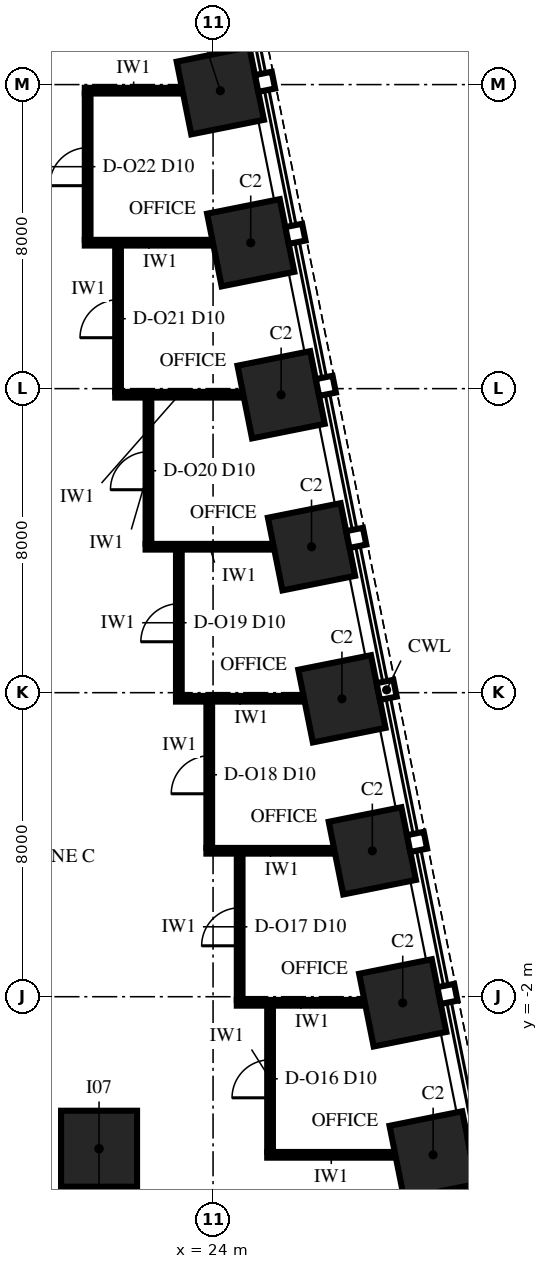
"""IFC4 building model, lengths in metres.
Left out: names, types, materials, properties, quantities, classifications, styles, units other than length and angle.
Written with IfcOpenShell. Run it as: python <this file> out.ifc"""

import sys

from ifc_helpers import new_model, si_unit, direction, frame, frame_2d, origin, origin_2d, place, context, subcontext, project, spatial, rectangle, extrude, element, fill, save


model = new_model("IFC4")
c1 = context("Model", 3, precision=1e-05, world=origin(), true_north=direction((0.0, 1.0)))
c2 = subcontext(c1, "Body", "Model", "MODEL_VIEW")
j1 = project(units=[si_unit("LENGTHUNIT", "METRE"), si_unit("PLANEANGLEUNIT", "RADIAN")], contexts=[c1])
p1 = place(None, origin())
s1 = spatial("IfcSite", under=j1, at=p1, CompositionType="ELEMENT")
p2 = place(p1, origin())
s2 = spatial("IfcBuilding", under=s1, at=p2, CompositionType="ELEMENT")
p3 = place(p2, frame((0.0, 0.0, 84.0)))
s3 = spatial("IfcBuildingStorey", under=s2, at=p3, CompositionType="ELEMENT", Elevation=84.0)
for number, where, z_axis, x_axis in (
    (1, (29.791, -6.162, 0.0), (0.0, 0.0, 1.0), (-0.196, 0.981, 0.0)),
    (2, (28.991, -2.162, 0.0), (0.0, 0.0, 1.0), (-0.196, 0.981, 0.0)),
    (3, (28.191, 1.838, 0.0), (0.0, 0.0, 1.0), (-0.196, 0.981, 0.0)),
    (4, (27.391, 5.838, 0.0), (0.0, 0.0, 1.0), (-0.196, 0.981, 0.0)),
    (5, (26.591, 9.838, 0.0), (0.0, 0.0, 1.0), (-0.196, 0.981, 0.0)),
    (6, (25.791, 13.838, 0.0), (0.0, 0.0, 1.0), (-0.196, 0.981, 0.0)),
    (7, (24.991, 17.838, 0.0), (0.0, 0.0, 1.0), (-0.196, 0.981, 0.0)),
    (8, (24.191, 21.838, 0.0), (0.0, 0.0, 1.0), (-0.196, 0.981, 0.0)),
):
    element("IfcColumn", number, at=place(p3, frame(where, z_axis=z_axis, x_axis=x_axis)), inside=s3, PredefinedType="COLUMN", context=c2, shape_type="SweptSolid", body=[
        extrude(rectangle(XDim=1.95, YDim=1.95, at=origin_2d()), origin(), (0.0, 0.0, 1.0), 4.0),
    ])
p4 = place(p3, frame((21.0, -6.0, 0.0), z_axis=(0.0, 0.0, 1.0), x_axis=(1.0, 0.0, 0.0)))
e9 = element("IfcColumn", 9, at=p4, inside=s3, PredefinedType="COLUMN", context=c2, shape_type="SweptSolid", body=[
    extrude(rectangle(XDim=2.0, YDim=2.0, at=origin_2d()), origin(), (0.0, 0.0, 1.0), 4.0),
])
p5 = place(p3, frame((25.425, -6.16, 0.0), z_axis=(0.0, 0.0, 1.0), x_axis=(1.0, 0.0, 0.0)))
e10 = element("IfcWall", 10, at=p5, inside=s3, PredefinedType="PARTITIONING", context=c2, shape_type="SweptSolid", body=[
    extrude(rectangle(XDim=3.371, YDim=0.15, at=frame_2d((1.686, 0.0))), origin(), (0.0, 0.0, 1.0), 2.842),
])
for number, where, z_axis, x_axis in (
    (11, (24.625, -2.16, 0.0), (0.0, 0.0, 1.0), (1.0, 0.0, 0.0)),
    (12, (23.825, 1.84, 0.0), (0.0, 0.0, 1.0), (1.0, 0.0, 0.0)),
):
    element("IfcWall", number, at=place(p3, frame(where, z_axis=z_axis, x_axis=x_axis)), inside=s3, PredefinedType="PARTITIONING", context=c2, shape_type="SweptSolid", body=[
        extrude(rectangle(XDim=3.371, YDim=0.15, at=frame_2d((1.686, 0.0))), origin(), (0.0, 0.0, 1.0), 3.25),
    ])
p6 = place(p3, frame((23.025, 5.84, 0.0), z_axis=(0.0, 0.0, 1.0), x_axis=(1.0, 0.0, 0.0)))
e13 = element("IfcWall", 13, at=p6, inside=s3, PredefinedType="PARTITIONING", context=c2, shape_type="SweptSolid", body=[
    extrude(rectangle(XDim=3.372, YDim=0.15, at=frame_2d((1.686, 0.0))), origin(), (0.0, 0.0, 1.0), 2.842),
])
for number, where, z_axis, x_axis in (
    (14, (22.225, 9.84, 0.0), (0.0, 0.0, 1.0), (1.0, 0.0, 0.0)),
    (15, (21.425, 13.84, 0.0), (0.0, 0.0, 1.0), (1.0, 0.0, 0.0)),
    (16, (20.625, 17.84, 0.0), (0.0, 0.0, 1.0), (1.0, 0.0, 0.0)),
):
    element("IfcWall", number, at=place(p3, frame(where, z_axis=z_axis, x_axis=x_axis)), inside=s3, PredefinedType="PARTITIONING", context=c2, shape_type="SweptSolid", body=[
        extrude(rectangle(XDim=3.371, YDim=0.15, at=frame_2d((1.686, 0.0))), origin(), (0.0, 0.0, 1.0), 3.25),
    ])
p7 = place(p3, frame((20.625, 21.84, 0.0), z_axis=(0.0, 0.0, 1.0), x_axis=(1.0, 0.0, 0.0)))
e17 = element("IfcWall", 17, at=p7, inside=s3, PredefinedType="PARTITIONING", context=c2, shape_type="SweptSolid", body=[
    extrude(rectangle(XDim=2.571, YDim=0.15, at=frame_2d((1.286, 0.0))), origin(), (0.0, 0.0, 1.0), 3.25),
])
p8 = place(p3, frame((20.7, 17.915, 0.0), z_axis=(0.0, 0.0, 1.0), x_axis=(0.0, 1.0, 0.0)))
e18 = element("IfcWall", 18, at=p8, inside=s3, PredefinedType="PARTITIONING", context=c2, shape_type="SweptSolid", body=[
    extrude(rectangle(XDim=3.85, YDim=0.15, at=frame_2d((1.925, 0.0))), origin(), (0.0, 0.0, 1.0), 3.25),
])
p9 = place(p8, frame((1.425, 0.0, 0.0)))
e19 = element("IfcOpeningElement", 19, at=p9, cuts=e18, PredefinedType="OPENING", context=c2, shape_type="SweptSolid", body=[
    extrude(rectangle(XDim=1.0, YDim=2.3, at=frame_2d((0.5, 1.15))), frame((0.0, 0.09, 0.0), z_axis=(0.0, -1.0, 0.0), x_axis=(1.0, 0.0, 0.0)), (0.0, 0.0, 1.0), 0.18),
])
p10 = place(p3, frame((21.5, 13.915, 0.0), z_axis=(0.0, 0.0, 1.0), x_axis=(0.0, 1.0, 0.0)))
e20 = element("IfcWall", 20, at=p10, inside=s3, PredefinedType="PARTITIONING", context=c2, shape_type="SweptSolid", body=[
    extrude(rectangle(XDim=3.85, YDim=0.15, at=frame_2d((1.925, 0.0))), origin(), (0.0, 0.0, 1.0), 3.25),
])
p11 = place(p10, frame((1.425, 0.0, 0.0)))
e21 = element("IfcOpeningElement", 21, at=p11, cuts=e20, PredefinedType="OPENING", context=c2, shape_type="SweptSolid", body=[
    extrude(rectangle(XDim=1.0, YDim=2.3, at=frame_2d((0.5, 1.15))), frame((0.0, 0.09, 0.0), z_axis=(0.0, -1.0, 0.0), x_axis=(1.0, 0.0, 0.0)), (0.0, 0.0, 1.0), 0.18),
])
p12 = place(p3, frame((22.3, 9.915, 0.0), z_axis=(0.0, 0.0, 1.0), x_axis=(0.0, 1.0, 0.0)))
e22 = element("IfcWall", 22, at=p12, inside=s3, PredefinedType="PARTITIONING", context=c2, shape_type="SweptSolid", body=[
    extrude(rectangle(XDim=3.85, YDim=0.15, at=frame_2d((1.925, 0.0))), origin(), (0.0, 0.0, 1.0), 3.85),
])
p13 = place(p12, frame((1.425, 0.0, 0.0)))
e23 = element("IfcOpeningElement", 23, at=p13, cuts=e22, PredefinedType="OPENING", context=c2, shape_type="SweptSolid", body=[
    extrude(rectangle(XDim=1.0, YDim=2.3, at=frame_2d((0.5, 1.15))), frame((0.0, 0.09, 0.0), z_axis=(0.0, -1.0, 0.0), x_axis=(1.0, 0.0, 0.0)), (0.0, 0.0, 1.0), 0.18),
])
p14 = place(p3, frame((23.1, 5.915, 0.0), z_axis=(0.0, 0.0, 1.0), x_axis=(0.0, 1.0, 0.0)))
e24 = element("IfcWall", 24, at=p14, inside=s3, PredefinedType="PARTITIONING", context=c2, shape_type="SweptSolid", body=[
    extrude(rectangle(XDim=3.85, YDim=0.15, at=frame_2d((1.925, 0.0))), origin(), (0.0, 0.0, 1.0), 2.842),
])
p15 = place(p14, frame((1.425, 0.0, 0.0)))
e25 = element("IfcOpeningElement", 25, at=p15, cuts=e24, PredefinedType="OPENING", context=c2, shape_type="SweptSolid", body=[
    extrude(rectangle(XDim=1.0, YDim=2.3, at=frame_2d((0.5, 1.15))), frame((0.0, 0.09, 0.0), z_axis=(0.0, -1.0, 0.0), x_axis=(1.0, 0.0, 0.0)), (0.0, 0.0, 1.0), 0.18),
])
p16 = place(p3, frame((23.9, 1.915, 0.0), z_axis=(0.0, 0.0, 1.0), x_axis=(0.0, 1.0, 0.0)))
e26 = element("IfcWall", 26, at=p16, inside=s3, PredefinedType="PARTITIONING", context=c2, shape_type="SweptSolid", body=[
    extrude(rectangle(XDim=3.85, YDim=0.15, at=frame_2d((1.925, 0.0))), origin(), (0.0, 0.0, 1.0), 3.85),
])
p17 = place(p16, frame((1.425, 0.0, 0.0)))
e27 = element("IfcOpeningElement", 27, at=p17, cuts=e26, PredefinedType="OPENING", context=c2, shape_type="SweptSolid", body=[
    extrude(rectangle(XDim=1.0, YDim=2.3, at=frame_2d((0.5, 1.15))), frame((0.0, 0.09, 0.0), z_axis=(0.0, -1.0, 0.0), x_axis=(1.0, 0.0, 0.0)), (0.0, 0.0, 1.0), 0.18),
])
p18 = place(p3, frame((24.7, -2.085, 0.0), z_axis=(0.0, 0.0, 1.0), x_axis=(0.0, 1.0, 0.0)))
e28 = element("IfcWall", 28, at=p18, inside=s3, PredefinedType="PARTITIONING", context=c2, shape_type="SweptSolid", body=[
    extrude(rectangle(XDim=3.85, YDim=0.15, at=frame_2d((1.925, 0.0))), origin(), (0.0, 0.0, 1.0), 3.85),
])
p19 = place(p18, frame((1.425, 0.0, 0.0)))
e29 = element("IfcOpeningElement", 29, at=p19, cuts=e28, PredefinedType="OPENING", context=c2, shape_type="SweptSolid", body=[
    extrude(rectangle(XDim=1.0, YDim=2.3, at=frame_2d((0.5, 1.15))), frame((0.0, 0.09, 0.0), z_axis=(0.0, -1.0, 0.0), x_axis=(1.0, 0.0, 0.0)), (0.0, 0.0, 1.0), 0.18),
])
p20 = place(p3, frame((25.5, -6.085, 0.0), z_axis=(0.0, 0.0, 1.0), x_axis=(0.0, 1.0, 0.0)))
e30 = element("IfcWall", 30, at=p20, inside=s3, PredefinedType="PARTITIONING", context=c2, shape_type="SweptSolid", body=[
    extrude(rectangle(XDim=3.85, YDim=0.15, at=frame_2d((1.925, 0.0))), origin(), (0.0, 0.0, 1.0), 2.842),
])
p21 = place(p20, frame((1.425, 0.0, 0.0)))
e31 = element("IfcOpeningElement", 31, at=p21, cuts=e30, PredefinedType="OPENING", context=c2, shape_type="SweptSolid", body=[
    extrude(rectangle(XDim=1.0, YDim=2.3, at=frame_2d((0.5, 1.15))), frame((0.0, 0.09, 0.0), z_axis=(0.0, -1.0, 0.0), x_axis=(1.0, 0.0, 0.0)), (0.0, 0.0, 1.0), 0.18),
])
p22 = place(p21, origin())
e32 = element("IfcDoor", 32, at=p22, inside=s3, OperationType="SINGLE_SWING_LEFT", PredefinedType="DOOR", context=c2, shape_type="SweptSolid", body=[
    extrude(rectangle(XDim=1.0, YDim=2.3, at=frame_2d((0.5, 1.15))), frame((0.0, 0.075, 0.0), z_axis=(0.0, -1.0, 0.0), x_axis=(1.0, 0.0, 0.0)), (0.0, 0.0, 1.0), 0.149),
])
fill(e31, e32)
p23 = place(p19, origin())
e33 = element("IfcDoor", 33, at=p23, inside=s3, OperationType="SINGLE_SWING_LEFT", PredefinedType="DOOR", context=c2, shape_type="SweptSolid", body=[
    extrude(rectangle(XDim=1.0, YDim=2.3, at=frame_2d((0.5, 1.15))), frame((0.0, 0.075, 0.0), z_axis=(0.0, -1.0, 0.0), x_axis=(1.0, 0.0, 0.0)), (0.0, 0.0, 1.0), 0.149),
])
fill(e29, e33)
p24 = place(p17, origin())
e34 = element("IfcDoor", 34, at=p24, inside=s3, OperationType="SINGLE_SWING_LEFT", PredefinedType="DOOR", context=c2, shape_type="SweptSolid", body=[
    extrude(rectangle(XDim=1.0, YDim=2.3, at=frame_2d((0.5, 1.15))), frame((0.0, 0.075, 0.0), z_axis=(0.0, -1.0, 0.0), x_axis=(1.0, 0.0, 0.0)), (0.0, 0.0, 1.0), 0.149),
])
fill(e27, e34)
p25 = place(p15, origin())
e35 = element("IfcDoor", 35, at=p25, inside=s3, OperationType="SINGLE_SWING_LEFT", PredefinedType="DOOR", context=c2, shape_type="SweptSolid", body=[
    extrude(rectangle(XDim=1.0, YDim=2.3, at=frame_2d((0.5, 1.15))), frame((0.0, 0.075, 0.0), z_axis=(0.0, -1.0, 0.0), x_axis=(1.0, 0.0, 0.0)), (0.0, 0.0, 1.0), 0.149),
])
fill(e25, e35)
p26 = place(p13, origin())
e36 = element("IfcDoor", 36, at=p26, inside=s3, OperationType="SINGLE_SWING_LEFT", PredefinedType="DOOR", context=c2, shape_type="SweptSolid", body=[
    extrude(rectangle(XDim=1.0, YDim=2.3, at=frame_2d((0.5, 1.15))), frame((0.0, 0.075, 0.0), z_axis=(0.0, -1.0, 0.0), x_axis=(1.0, 0.0, 0.0)), (0.0, 0.0, 1.0), 0.149),
])
fill(e23, e36)
p27 = place(p11, origin())
e37 = element("IfcDoor", 37, at=p27, inside=s3, OperationType="SINGLE_SWING_LEFT", PredefinedType="DOOR", context=c2, shape_type="SweptSolid", body=[
    extrude(rectangle(XDim=1.0, YDim=2.3, at=frame_2d((0.5, 1.15))), frame((0.0, 0.075, 0.0), z_axis=(0.0, -1.0, 0.0), x_axis=(1.0, 0.0, 0.0)), (0.0, 0.0, 1.0), 0.149),
])
fill(e21, e37)
p28 = place(p9, origin())
e38 = element("IfcDoor", 38, at=p28, inside=s3, OperationType="SINGLE_SWING_LEFT", PredefinedType="DOOR", context=c2, shape_type="SweptSolid", body=[
    extrude(rectangle(XDim=1.0, YDim=2.3, at=frame_2d((0.5, 1.15))), frame((0.0, 0.075, 0.0), z_axis=(0.0, -1.0, 0.0), x_axis=(1.0, 0.0, 0.0)), (0.0, 0.0, 1.0), 0.149),
])
fill(e19, e38)
save(model, sys.argv[1])
